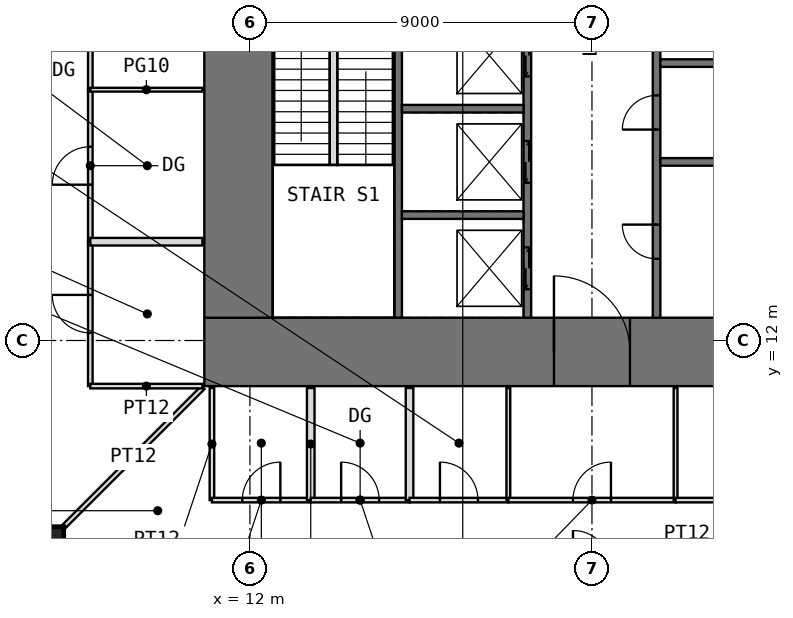
"""IFC4 building model, lengths in metres.
Left out: names, types, materials, properties, quantities, classifications, styles, units other than length and angle.
Written with IfcOpenShell. Run it as: python <this file> out.ifc"""

import sys

from ifc_helpers import new_model, si_unit, direction, frame, frame_2d, origin, origin_2d, place, context, subcontext, project, spatial, rectangle, extrude, element, fill, save


model = new_model("IFC4")
c1 = context("Model", 3, precision=1e-05, world=origin(), true_north=direction((0.0, 1.0)))
c2 = subcontext(c1, "Body", "Model", "MODEL_VIEW")
j1 = project(units=[si_unit("LENGTHUNIT", "METRE"), si_unit("PLANEANGLEUNIT", "RADIAN")], contexts=[c1])
p1 = place(None, origin())
s1 = spatial("IfcSite", under=j1, at=p1, CompositionType="ELEMENT")
p2 = place(p1, origin())
s2 = spatial("IfcBuilding", under=s1, at=p2, CompositionType="ELEMENT")
p3 = place(p2, frame((0.0, 0.0, 66.5)))
s3 = spatial("IfcBuildingStorey", under=s2, at=p3, CompositionType="ELEMENT", Elevation=66.5)
p4 = place(p3, frame((6.55, 6.55, 0.0), z_axis=(0.0, 0.0, 1.0), x_axis=(1.0, 0.0, 0.0)))
e1 = element("IfcColumn", 1, at=p4, inside=s3, PredefinedType="COLUMN", context=c2, shape_type="SweptSolid", body=[
    extrude(rectangle(XDim=1.1, YDim=1.1, at=origin_2d()), origin(), (0.0, 0.0, 1.0), 4.0),
])
p5 = place(p3, frame((10.8, 11.7, -0.05), z_axis=(0.0, 0.0, 1.0), x_axis=(1.0, 0.0, 0.0)))
e2 = element("IfcWall", 2, at=p5, inside=s3, PredefinedType="SHEAR", context=c2, shape_type="SweptSolid", body=[
    extrude(rectangle(XDim=20.4, YDim=1.8, at=frame_2d((10.2, 0.0))), origin(), (0.0, 0.0, 1.0), 4.0),
])
p6 = place(p5, frame((9.2, 0.0, 0.05)))
e3 = element("IfcOpeningElement", 3, at=p6, cuts=e2, PredefinedType="OPENING", context=c2, shape_type="SweptSolid", body=[
    extrude(rectangle(XDim=2.0, YDim=2.2, at=frame_2d((1.0, 1.1))), frame((0.0, 0.91, 0.0), z_axis=(0.0, -1.0, 0.0), x_axis=(1.0, 0.0, 0.0)), (0.0, 0.0, 1.0), 1.82),
])
p7 = place(p3, frame((11.7, 12.6, -0.05), z_axis=(0.0, 0.0, 1.0), x_axis=(0.0, 1.0, 0.0)))
e4 = element("IfcWall", 4, at=p7, inside=s3, PredefinedType="SHEAR", context=c2, shape_type="SweptSolid", body=[
    extrude(rectangle(XDim=16.8, YDim=1.8, at=frame_2d((8.4, 0.0))), origin(), (0.0, 0.0, 1.0), 4.0),
])
p8 = place(p7, frame((9.9, 0.0, 0.05)))
e5 = element("IfcOpeningElement", 5, at=p8, cuts=e4, PredefinedType="OPENING", context=c2, shape_type="SweptSolid", body=[
    extrude(rectangle(XDim=1.0, YDim=2.2, at=frame_2d((0.5, 1.1))), frame((0.0, 0.91, 0.0), z_axis=(0.0, -1.0, 0.0), x_axis=(1.0, 0.0, 0.0)), (0.0, 0.0, 1.0), 1.82),
])
p9 = place(p3, frame((15.9, 12.6, -0.05), z_axis=(0.0, 0.0, 1.0), x_axis=(0.0, 1.0, 0.0)))
e6 = element("IfcWall", 6, at=p9, inside=s3, PredefinedType="SHEAR", context=c2, shape_type="SweptSolid", body=[
    extrude(rectangle(XDim=16.8, YDim=0.2, at=frame_2d((8.4, 0.0))), origin(), (0.0, 0.0, 1.0), 4.0),
])
p10 = place(p9, frame((8.9, 0.0, 0.05)))
e7 = element("IfcOpeningElement", 7, at=p10, cuts=e6, PredefinedType="OPENING", context=c2, shape_type="SweptSolid", body=[
    extrude(rectangle(XDim=1.0, YDim=2.2, at=frame_2d((0.5, 1.1))), frame((0.0, 0.11, 0.0), z_axis=(0.0, -1.0, 0.0), x_axis=(1.0, 0.0, 0.0)), (0.0, 0.0, 1.0), 0.22),
])
p11 = place(p3, frame((19.3, 12.6, -0.05), z_axis=(0.0, 0.0, 1.0), x_axis=(0.0, 1.0, 0.0)))
e8 = element("IfcWall", 8, at=p11, inside=s3, PredefinedType="SHEAR", context=c2, shape_type="SweptSolid", body=[
    extrude(rectangle(XDim=16.8, YDim=0.2, at=frame_2d((8.4, 0.0))), origin(), (0.0, 0.0, 1.0), 4.0),
])
p12 = place(p11, frame((8.7, 0.0, 0.05)))
e9 = element("IfcOpeningElement", 9, at=p12, cuts=e8, PredefinedType="OPENING", context=c2, shape_type="SweptSolid", body=[
    extrude(rectangle(XDim=1.0, YDim=2.2, at=frame_2d((0.5, 1.1))), frame((0.0, 0.11, 0.0), z_axis=(0.0, -1.0, 0.0), x_axis=(1.0, 0.0, 0.0)), (0.0, 0.0, 1.0), 0.22),
])
p13 = place(p11, frame((10.85, 0.0, 0.05)))
e10 = element("IfcOpeningElement", 10, at=p13, cuts=e8, PredefinedType="OPENING", context=c2, shape_type="SweptSolid", body=[
    extrude(rectangle(XDim=0.9, YDim=2.2, at=frame_2d((0.45, 1.1))), frame((0.0, 0.11, 0.0), z_axis=(0.0, -1.0, 0.0), x_axis=(1.0, 0.0, 0.0)), (0.0, 0.0, 1.0), 0.22),
])
p14 = place(p11, frame((13.3, 0.0, 0.05)))
e11 = element("IfcOpeningElement", 11, at=p14, cuts=e8, PredefinedType="OPENING", context=c2, shape_type="SweptSolid", body=[
    extrude(rectangle(XDim=1.0, YDim=2.2, at=frame_2d((0.5, 1.1))), frame((0.0, 0.11, 0.0), z_axis=(0.0, -1.0, 0.0), x_axis=(1.0, 0.0, 0.0)), (0.0, 0.0, 1.0), 0.22),
])
p15 = place(p11, frame((15.55, 0.0, 0.05)))
e12 = element("IfcOpeningElement", 12, at=p15, cuts=e8, PredefinedType="OPENING", context=c2, shape_type="SweptSolid", body=[
    extrude(rectangle(XDim=0.9, YDim=2.2, at=frame_2d((0.45, 1.1))), frame((0.0, 0.11, 0.0), z_axis=(0.0, -1.0, 0.0), x_axis=(1.0, 0.0, 0.0)), (0.0, 0.0, 1.0), 0.22),
])
p16 = place(p11, frame((0.75, 0.0, 0.05)))
e13 = element("IfcOpeningElement", 13, at=p16, cuts=e8, PredefinedType="OPENING", context=c2, shape_type="SweptSolid", body=[
    extrude(rectangle(XDim=1.1, YDim=2.2, at=frame_2d((0.55, 1.1))), frame((0.0, 0.11, 0.0), z_axis=(0.0, -1.0, 0.0), x_axis=(1.0, 0.0, 0.0)), (0.0, 0.0, 1.0), 0.22),
])
p17 = place(p11, frame((3.55, 0.0, 0.05)))
e14 = element("IfcOpeningElement", 14, at=p17, cuts=e8, PredefinedType="OPENING", context=c2, shape_type="SweptSolid", body=[
    extrude(rectangle(XDim=1.1, YDim=2.2, at=frame_2d((0.55, 1.1))), frame((0.0, 0.11, 0.0), z_axis=(0.0, -1.0, 0.0), x_axis=(1.0, 0.0, 0.0)), (0.0, 0.0, 1.0), 0.22),
])
p18 = place(p11, frame((6.35, 0.0, 0.05)))
e15 = element("IfcOpeningElement", 15, at=p18, cuts=e8, PredefinedType="OPENING", context=c2, shape_type="SweptSolid", body=[
    extrude(rectangle(XDim=1.1, YDim=2.2, at=frame_2d((0.55, 1.1))), frame((0.0, 0.11, 0.0), z_axis=(0.0, -1.0, 0.0), x_axis=(1.0, 0.0, 0.0)), (0.0, 0.0, 1.0), 0.22),
])
p19 = place(p3, frame((22.7, 12.6, -0.05), z_axis=(0.0, 0.0, 1.0), x_axis=(0.0, 1.0, 0.0)))
e16 = element("IfcWall", 16, at=p19, inside=s3, PredefinedType="SHEAR", context=c2, shape_type="SweptSolid", body=[
    extrude(rectangle(XDim=16.8, YDim=0.2, at=frame_2d((8.4, 0.0))), origin(), (0.0, 0.0, 1.0), 4.0),
])
p20 = place(p19, frame((7.1, 0.0, 0.05)))
e17 = element("IfcOpeningElement", 17, at=p20, cuts=e16, PredefinedType="OPENING", context=c2, shape_type="SweptSolid", body=[
    extrude(rectangle(XDim=1.0, YDim=2.2, at=frame_2d((0.5, 1.1))), frame((0.0, 0.11, 0.0), z_axis=(0.0, -1.0, 0.0), x_axis=(1.0, 0.0, 0.0)), (0.0, 0.0, 1.0), 0.22),
])
p21 = place(p19, frame((1.55, 0.0, 0.05)))
e18 = element("IfcOpeningElement", 18, at=p21, cuts=e16, PredefinedType="OPENING", context=c2, shape_type="SweptSolid", body=[
    extrude(rectangle(XDim=0.9, YDim=2.2, at=frame_2d((0.45, 1.1))), frame((0.0, 0.11, 0.0), z_axis=(0.0, -1.0, 0.0), x_axis=(1.0, 0.0, 0.0)), (0.0, 0.0, 1.0), 0.22),
])
p22 = place(p19, frame((4.95, 0.0, 0.05)))
e19 = element("IfcOpeningElement", 19, at=p22, cuts=e16, PredefinedType="OPENING", context=c2, shape_type="SweptSolid", body=[
    extrude(rectangle(XDim=0.9, YDim=2.2, at=frame_2d((0.45, 1.1))), frame((0.0, 0.11, 0.0), z_axis=(0.0, -1.0, 0.0), x_axis=(1.0, 0.0, 0.0)), (0.0, 0.0, 1.0), 0.22),
])
for number, where, z_axis, x_axis in (
    (20, (16.0, 15.3, -0.05), (0.0, 0.0, 1.0), (1.0, 0.0, 0.0)),
    (21, (16.0, 18.1, -0.05), (0.0, 0.0, 1.0), (1.0, 0.0, 0.0)),
    (22, (22.8, 16.7, -0.05), (0.0, 0.0, 1.0), (1.0, 0.0, 0.0)),
    (23, (22.8, 19.3, -0.05), (0.0, 0.0, 1.0), (1.0, 0.0, 0.0)),
):
    element("IfcWall", number, at=place(p3, frame(where, z_axis=z_axis, x_axis=x_axis)), inside=s3, PredefinedType="SHEAR", context=c2, shape_type="SweptSolid", body=[
        extrude(rectangle(XDim=3.2, YDim=0.2, at=frame_2d((1.6, 0.0))), origin(), (0.0, 0.0, 1.0), 4.0),
    ])
p23 = place(p3, frame((7.11, 7.11, 0.0), z_axis=(0.0, 0.0, 1.0), x_axis=(0.707106781187, 0.707106781187, 0.0)))
e24 = element("IfcWall", 24, at=p23, inside=s3, PredefinedType="PARTITIONING", context=c2, shape_type="SweptSolid", body=[
    extrude(rectangle(XDim=5.168, YDim=0.12, at=frame_2d((2.584, 0.0))), origin(), (0.0, 0.0, 1.0), 3.75),
])
p24 = place(p3, frame((7.8, 10.8, 0.0), z_axis=(0.0, 0.0, 1.0), x_axis=(0.0, 1.0, 0.0)))
e25 = element("IfcWall", 25, at=p24, inside=s3, PredefinedType="PARTITIONING", context=c2, shape_type="SweptSolid", body=[
    extrude(rectangle(XDim=3.8, YDim=0.12, at=frame_2d((1.9, 0.0))), origin(), (0.0, 0.0, 1.0), 3.75),
])
p25 = place(p24, frame((1.4, 0.0, 0.0)))
e26 = element("IfcOpeningElement", 26, at=p25, cuts=e25, PredefinedType="OPENING", context=c2, shape_type="SweptSolid", body=[
    extrude(rectangle(XDim=1.0, YDim=2.4, at=frame_2d((0.5, 1.2))), frame((0.0, 0.07, 0.0), z_axis=(0.0, -1.0, 0.0), x_axis=(1.0, 0.0, 0.0)), (0.0, 0.0, 1.0), 0.14),
])
p26 = place(p3, frame((7.8, 10.8, 0.0), z_axis=(0.0, 0.0, 1.0), x_axis=(1.0, 0.0, 0.0)))
e27 = element("IfcWall", 27, at=p26, inside=s3, PredefinedType="PARTITIONING", context=c2, shape_type="SweptSolid", body=[
    extrude(rectangle(XDim=2.95, YDim=0.12, at=frame_2d((1.475, 0.0))), origin(), (0.0, 0.0, 1.0), 3.75),
])
p27 = place(p3, frame((7.8, 14.6, 0.0), z_axis=(0.0, 0.0, 1.0), x_axis=(0.0, 1.0, 0.0)))
e28 = element("IfcWall", 28, at=p27, inside=s3, PredefinedType="PARTITIONING", context=c2, shape_type="SweptSolid", body=[
    extrude(rectangle(XDim=4.0, YDim=0.12, at=frame_2d((2.0, 0.0))), origin(), (0.0, 0.0, 1.0), 3.75),
])
p28 = place(p27, frame((1.5, 0.0, 0.0)))
e29 = element("IfcOpeningElement", 29, at=p28, cuts=e28, PredefinedType="OPENING", context=c2, shape_type="SweptSolid", body=[
    extrude(rectangle(XDim=1.0, YDim=2.4, at=frame_2d((0.5, 1.2))), frame((0.0, 0.07, 0.0), z_axis=(0.0, -1.0, 0.0), x_axis=(1.0, 0.0, 0.0)), (0.0, 0.0, 1.0), 0.14),
])
p29 = place(p3, frame((7.8, 14.6, 0.0), z_axis=(0.0, 0.0, 1.0), x_axis=(1.0, 0.0, 0.0)))
e30 = element("IfcWall", 30, at=p29, inside=s3, PredefinedType="PARTITIONING", context=c2, shape_type="SweptSolid", body=[
    extrude(rectangle(XDim=2.95, YDim=0.2, at=frame_2d((1.475, 0.0))), origin(), (0.0, 0.0, 1.0), 3.75),
])
p30 = place(p3, frame((7.8, 18.6, 0.0), z_axis=(0.0, 0.0, 1.0), x_axis=(0.0, 1.0, 0.0)))
e31 = element("IfcWall", 31, at=p30, inside=s3, PredefinedType="PARTITIONING", context=c2, shape_type="SweptSolid", body=[
    extrude(rectangle(XDim=3.2, YDim=0.12, at=frame_2d((1.6, 0.0))), origin(), (0.0, 0.0, 1.0), 3.75),
])
p31 = place(p30, frame((1.9, 0.0, 0.0)))
e32 = element("IfcOpeningElement", 32, at=p31, cuts=e31, PredefinedType="OPENING", context=c2, shape_type="SweptSolid", body=[
    extrude(rectangle(XDim=1.0, YDim=2.4, at=frame_2d((0.5, 1.2))), frame((0.0, 0.07, 0.0), z_axis=(0.0, -1.0, 0.0), x_axis=(1.0, 0.0, 0.0)), (0.0, 0.0, 1.0), 0.14),
])
p32 = place(p3, frame((7.8, 18.6, 0.0), z_axis=(0.0, 0.0, 1.0), x_axis=(1.0, 0.0, 0.0)))
e33 = element("IfcWall", 33, at=p32, inside=s3, PredefinedType="PARTITIONING", context=c2, shape_type="SweptSolid", body=[
    extrude(rectangle(XDim=2.95, YDim=0.1, at=frame_2d((1.475, 0.0))), origin(), (0.0, 0.0, 1.0), 3.75),
])
p33 = place(p3, frame((11.0, 7.8, 0.0), z_axis=(0.0, 0.0, 1.0), x_axis=(0.0, 1.0, 0.0)))
e34 = element("IfcWall", 34, at=p33, inside=s3, PredefinedType="PARTITIONING", context=c2, shape_type="SweptSolid", body=[
    extrude(rectangle(XDim=2.95, YDim=0.12, at=frame_2d((1.475, 0.0))), origin(), (0.0, 0.0, 1.0), 3.75),
])
p34 = place(p3, frame((11.0, 7.8, 0.0), z_axis=(0.0, 0.0, 1.0), x_axis=(1.0, 0.0, 0.0)))
e35 = element("IfcWall", 35, at=p34, inside=s3, PredefinedType="PARTITIONING", context=c2, shape_type="SweptSolid", body=[
    extrude(rectangle(XDim=2.6, YDim=0.12, at=frame_2d((1.3, 0.0))), origin(), (0.0, 0.0, 1.0), 3.75),
])
p35 = place(p34, frame((0.8, 0.0, 0.0)))
e36 = element("IfcOpeningElement", 36, at=p35, cuts=e35, PredefinedType="OPENING", context=c2, shape_type="SweptSolid", body=[
    extrude(rectangle(XDim=1.0, YDim=2.4, at=frame_2d((0.5, 1.2))), frame((0.0, 0.07, 0.0), z_axis=(0.0, -1.0, 0.0), x_axis=(1.0, 0.0, 0.0)), (0.0, 0.0, 1.0), 0.14),
])
p36 = place(p3, frame((13.6, 7.8, 0.0), z_axis=(0.0, 0.0, 1.0), x_axis=(0.0, 1.0, 0.0)))
e37 = element("IfcWall", 37, at=p36, inside=s3, PredefinedType="PARTITIONING", context=c2, shape_type="SweptSolid", body=[
    extrude(rectangle(XDim=2.95, YDim=0.2, at=frame_2d((1.475, 0.0))), origin(), (0.0, 0.0, 1.0), 3.75),
])
p37 = place(p3, frame((13.6, 7.8, 0.0), z_axis=(0.0, 0.0, 1.0), x_axis=(1.0, 0.0, 0.0)))
e38 = element("IfcWall", 38, at=p37, inside=s3, PredefinedType="PARTITIONING", context=c2, shape_type="SweptSolid", body=[
    extrude(rectangle(XDim=2.6, YDim=0.12, at=frame_2d((1.3, 0.0))), origin(), (0.0, 0.0, 1.0), 3.75),
])
p38 = place(p37, frame((0.8, 0.0, 0.0)))
e39 = element("IfcOpeningElement", 39, at=p38, cuts=e38, PredefinedType="OPENING", context=c2, shape_type="SweptSolid", body=[
    extrude(rectangle(XDim=1.0, YDim=2.4, at=frame_2d((0.5, 1.2))), frame((0.0, 0.07, 0.0), z_axis=(0.0, -1.0, 0.0), x_axis=(1.0, 0.0, 0.0)), (0.0, 0.0, 1.0), 0.14),
])
p39 = place(p3, frame((16.2, 7.8, 0.0), z_axis=(0.0, 0.0, 1.0), x_axis=(0.0, 1.0, 0.0)))
e40 = element("IfcWall", 40, at=p39, inside=s3, PredefinedType="PARTITIONING", context=c2, shape_type="SweptSolid", body=[
    extrude(rectangle(XDim=2.95, YDim=0.2, at=frame_2d((1.475, 0.0))), origin(), (0.0, 0.0, 1.0), 3.75),
])
p40 = place(p3, frame((16.2, 7.8, 0.0), z_axis=(0.0, 0.0, 1.0), x_axis=(1.0, 0.0, 0.0)))
e41 = element("IfcWall", 41, at=p40, inside=s3, PredefinedType="PARTITIONING", context=c2, shape_type="SweptSolid", body=[
    extrude(rectangle(XDim=2.6, YDim=0.12, at=frame_2d((1.3, 0.0))), origin(), (0.0, 0.0, 1.0), 3.75),
])
p41 = place(p40, frame((0.8, 0.0, 0.0)))
e42 = element("IfcOpeningElement", 42, at=p41, cuts=e41, PredefinedType="OPENING", context=c2, shape_type="SweptSolid", body=[
    extrude(rectangle(XDim=1.0, YDim=2.4, at=frame_2d((0.5, 1.2))), frame((0.0, 0.07, 0.0), z_axis=(0.0, -1.0, 0.0), x_axis=(1.0, 0.0, 0.0)), (0.0, 0.0, 1.0), 0.14),
])
p42 = place(p3, frame((18.8, 7.8, 0.0), z_axis=(0.0, 0.0, 1.0), x_axis=(0.0, 1.0, 0.0)))
e43 = element("IfcWall", 43, at=p42, inside=s3, PredefinedType="PARTITIONING", context=c2, shape_type="SweptSolid", body=[
    extrude(rectangle(XDim=2.95, YDim=0.1, at=frame_2d((1.475, 0.0))), origin(), (0.0, 0.0, 1.0), 3.75),
])
p43 = place(p3, frame((18.8, 7.8, 0.0), z_axis=(0.0, 0.0, 1.0), x_axis=(1.0, 0.0, 0.0)))
e44 = element("IfcWall", 44, at=p43, inside=s3, PredefinedType="PARTITIONING", context=c2, shape_type="SweptSolid", body=[
    extrude(rectangle(XDim=4.4, YDim=0.12, at=frame_2d((2.2, 0.0))), origin(), (0.0, 0.0, 1.0), 3.75),
])
p44 = place(p43, frame((1.7, 0.0, 0.0)))
e45 = element("IfcOpeningElement", 45, at=p44, cuts=e44, PredefinedType="OPENING", context=c2, shape_type="SweptSolid", body=[
    extrude(rectangle(XDim=1.0, YDim=2.4, at=frame_2d((0.5, 1.2))), frame((0.0, 0.07, 0.0), z_axis=(0.0, -1.0, 0.0), x_axis=(1.0, 0.0, 0.0)), (0.0, 0.0, 1.0), 0.14),
])
p45 = place(p3, frame((23.2, 7.8, 0.0), z_axis=(0.0, 0.0, 1.0), x_axis=(0.0, 1.0, 0.0)))
e46 = element("IfcWall", 46, at=p45, inside=s3, PredefinedType="PARTITIONING", context=c2, shape_type="SweptSolid", body=[
    extrude(rectangle(XDim=2.95, YDim=0.1, at=frame_2d((1.475, 0.0))), origin(), (0.0, 0.0, 1.0), 3.75),
])
p46 = place(p3, frame((23.2, 7.8, 0.0), z_axis=(0.0, 0.0, 1.0), x_axis=(1.0, 0.0, 0.0)))
e47 = element("IfcWall", 47, at=p46, inside=s3, PredefinedType="PARTITIONING", context=c2, shape_type="SweptSolid", body=[
    extrude(rectangle(XDim=8.0, YDim=0.12, at=frame_2d((4.0, 0.0))), origin(), (0.0, 0.0, 1.0), 3.75),
])
p47 = place(p46, frame((3.1, 0.0, 0.0)))
e48 = element("IfcOpeningElement", 48, at=p47, cuts=e47, PredefinedType="OPENING", context=c2, shape_type="SweptSolid", body=[
    extrude(rectangle(XDim=1.8, YDim=2.4, at=frame_2d((0.9, 1.2))), frame((0.0, 0.07, 0.0), z_axis=(0.0, -1.0, 0.0), x_axis=(1.0, 0.0, 0.0)), (0.0, 0.0, 1.0), 0.14),
])
p48 = place(p3, frame((14.2, 16.62, 0.0), z_axis=(0.0, 0.0, 1.0), x_axis=(0.0, 1.0, 0.0)))
e49 = element("IfcWall", 49, at=p48, inside=s3, PredefinedType="PARTITIONING", context=c2, shape_type="SweptSolid", body=[
    extrude(rectangle(XDim=3.08, YDim=0.2, at=frame_2d((1.54, 0.0))), origin(), (0.0, 0.0, 1.0), 4.0),
])
p49 = place(p6, origin())
e50 = element("IfcDoor", 50, at=p49, inside=s3, OperationType="DOUBLE_DOOR_SINGLE_SWING", PredefinedType="DOOR", context=c2, shape_type="SweptSolid", body=[
    extrude(rectangle(XDim=2.0, YDim=2.2, at=frame_2d((1.0, 1.1))), frame((0.0, 0.025, 0.0), z_axis=(0.0, -1.0, 0.0), x_axis=(1.0, 0.0, 0.0)), (0.0, 0.0, 1.0), 0.05),
])
fill(e3, e50)
p50 = place(p21, origin())
e51 = element("IfcDoor", 51, at=p50, inside=s3, OperationType="SINGLE_SWING_RIGHT", PredefinedType="DOOR", context=c2, shape_type="SweptSolid", body=[
    extrude(rectangle(XDim=0.9, YDim=2.2, at=frame_2d((0.45, 1.1))), frame((0.0, 0.025, 0.0), z_axis=(0.0, -1.0, 0.0), x_axis=(1.0, 0.0, 0.0)), (0.0, 0.0, 1.0), 0.05),
])
fill(e18, e51)
p51 = place(p22, origin())
e52 = element("IfcDoor", 52, at=p51, inside=s3, OperationType="SINGLE_SWING_LEFT", PredefinedType="DOOR", context=c2, shape_type="SweptSolid", body=[
    extrude(rectangle(XDim=0.9, YDim=2.2, at=frame_2d((0.45, 1.1))), frame((0.0, 0.025, 0.0), z_axis=(0.0, -1.0, 0.0), x_axis=(1.0, 0.0, 0.0)), (0.0, 0.0, 1.0), 0.05),
])
fill(e19, e52)
p52 = place(p35, origin())
e53 = element("IfcDoor", 53, at=p52, inside=s3, OperationType="SINGLE_SWING_RIGHT", PredefinedType="DOOR", context=c2, shape_type="SweptSolid", body=[
    extrude(rectangle(XDim=1.0, YDim=2.4, at=frame_2d((0.5, 1.2))), frame((0.0, 0.025, 0.0), z_axis=(0.0, -1.0, 0.0), x_axis=(1.0, 0.0, 0.0)), (0.0, 0.0, 1.0), 0.05),
])
fill(e36, e53)
p53 = place(p38, origin())
e54 = element("IfcDoor", 54, at=p53, inside=s3, OperationType="SINGLE_SWING_LEFT", PredefinedType="DOOR", context=c2, shape_type="SweptSolid", body=[
    extrude(rectangle(XDim=1.0, YDim=2.4, at=frame_2d((0.5, 1.2))), frame((0.0, 0.025, 0.0), z_axis=(0.0, -1.0, 0.0), x_axis=(1.0, 0.0, 0.0)), (0.0, 0.0, 1.0), 0.05),
])
fill(e39, e54)
p54 = place(p41, origin())
e55 = element("IfcDoor", 55, at=p54, inside=s3, OperationType="SINGLE_SWING_LEFT", PredefinedType="DOOR", context=c2, shape_type="SweptSolid", body=[
    extrude(rectangle(XDim=1.0, YDim=2.4, at=frame_2d((0.5, 1.2))), frame((0.0, 0.025, 0.0), z_axis=(0.0, -1.0, 0.0), x_axis=(1.0, 0.0, 0.0)), (0.0, 0.0, 1.0), 0.05),
])
fill(e42, e55)
p55 = place(p25, origin())
e56 = element("IfcDoor", 56, at=p55, inside=s3, OperationType="SINGLE_SWING_RIGHT", PredefinedType="DOOR", context=c2, shape_type="SweptSolid", body=[
    extrude(rectangle(XDim=1.0, YDim=2.4, at=frame_2d((0.5, 1.2))), frame((0.0, 0.025, 0.0), z_axis=(0.0, -1.0, 0.0), x_axis=(1.0, 0.0, 0.0)), (0.0, 0.0, 1.0), 0.05),
])
fill(e26, e56)
p56 = place(p28, origin())
e57 = element("IfcDoor", 57, at=p56, inside=s3, OperationType="SINGLE_SWING_LEFT", PredefinedType="DOOR", context=c2, shape_type="SweptSolid", body=[
    extrude(rectangle(XDim=1.0, YDim=2.4, at=frame_2d((0.5, 1.2))), frame((0.0, 0.025, 0.0), z_axis=(0.0, -1.0, 0.0), x_axis=(1.0, 0.0, 0.0)), (0.0, 0.0, 1.0), 0.05),
])
fill(e29, e57)
p57 = place(p44, origin())
e58 = element("IfcDoor", 58, at=p57, inside=s3, OperationType="SINGLE_SWING_RIGHT", PredefinedType="DOOR", context=c2, shape_type="SweptSolid", body=[
    extrude(rectangle(XDim=1.0, YDim=2.4, at=frame_2d((0.5, 1.2))), frame((0.0, 0.025, 0.0), z_axis=(0.0, -1.0, 0.0), x_axis=(1.0, 0.0, 0.0)), (0.0, 0.0, 1.0), 0.05),
])
fill(e45, e58)
p58 = place(p16, origin())
e59 = element("IfcDoor", 59, at=p58, inside=s3, OperationType="DOUBLE_DOOR_SLIDING", PredefinedType="DOOR", context=c2, shape_type="SweptSolid", body=[
    extrude(rectangle(XDim=1.1, YDim=2.2, at=frame_2d((0.55, 1.1))), frame((0.0, 0.025, 0.0), z_axis=(0.0, -1.0, 0.0), x_axis=(1.0, 0.0, 0.0)), (0.0, 0.0, 1.0), 0.05),
])
fill(e13, e59)
p59 = place(p17, origin())
e60 = element("IfcDoor", 60, at=p59, inside=s3, OperationType="DOUBLE_DOOR_SLIDING", PredefinedType="DOOR", context=c2, shape_type="SweptSolid", body=[
    extrude(rectangle(XDim=1.1, YDim=2.2, at=frame_2d((0.55, 1.1))), frame((0.0, 0.025, 0.0), z_axis=(0.0, -1.0, 0.0), x_axis=(1.0, 0.0, 0.0)), (0.0, 0.0, 1.0), 0.05),
])
fill(e14, e60)
p60 = place(p18, origin())
e61 = element("IfcDoor", 61, at=p60, inside=s3, OperationType="DOUBLE_DOOR_SLIDING", PredefinedType="DOOR", context=c2, shape_type="SweptSolid", body=[
    extrude(rectangle(XDim=1.1, YDim=2.2, at=frame_2d((0.55, 1.1))), frame((0.0, 0.025, 0.0), z_axis=(0.0, -1.0, 0.0), x_axis=(1.0, 0.0, 0.0)), (0.0, 0.0, 1.0), 0.05),
])
fill(e15, e61)
save(model, sys.argv[1])
